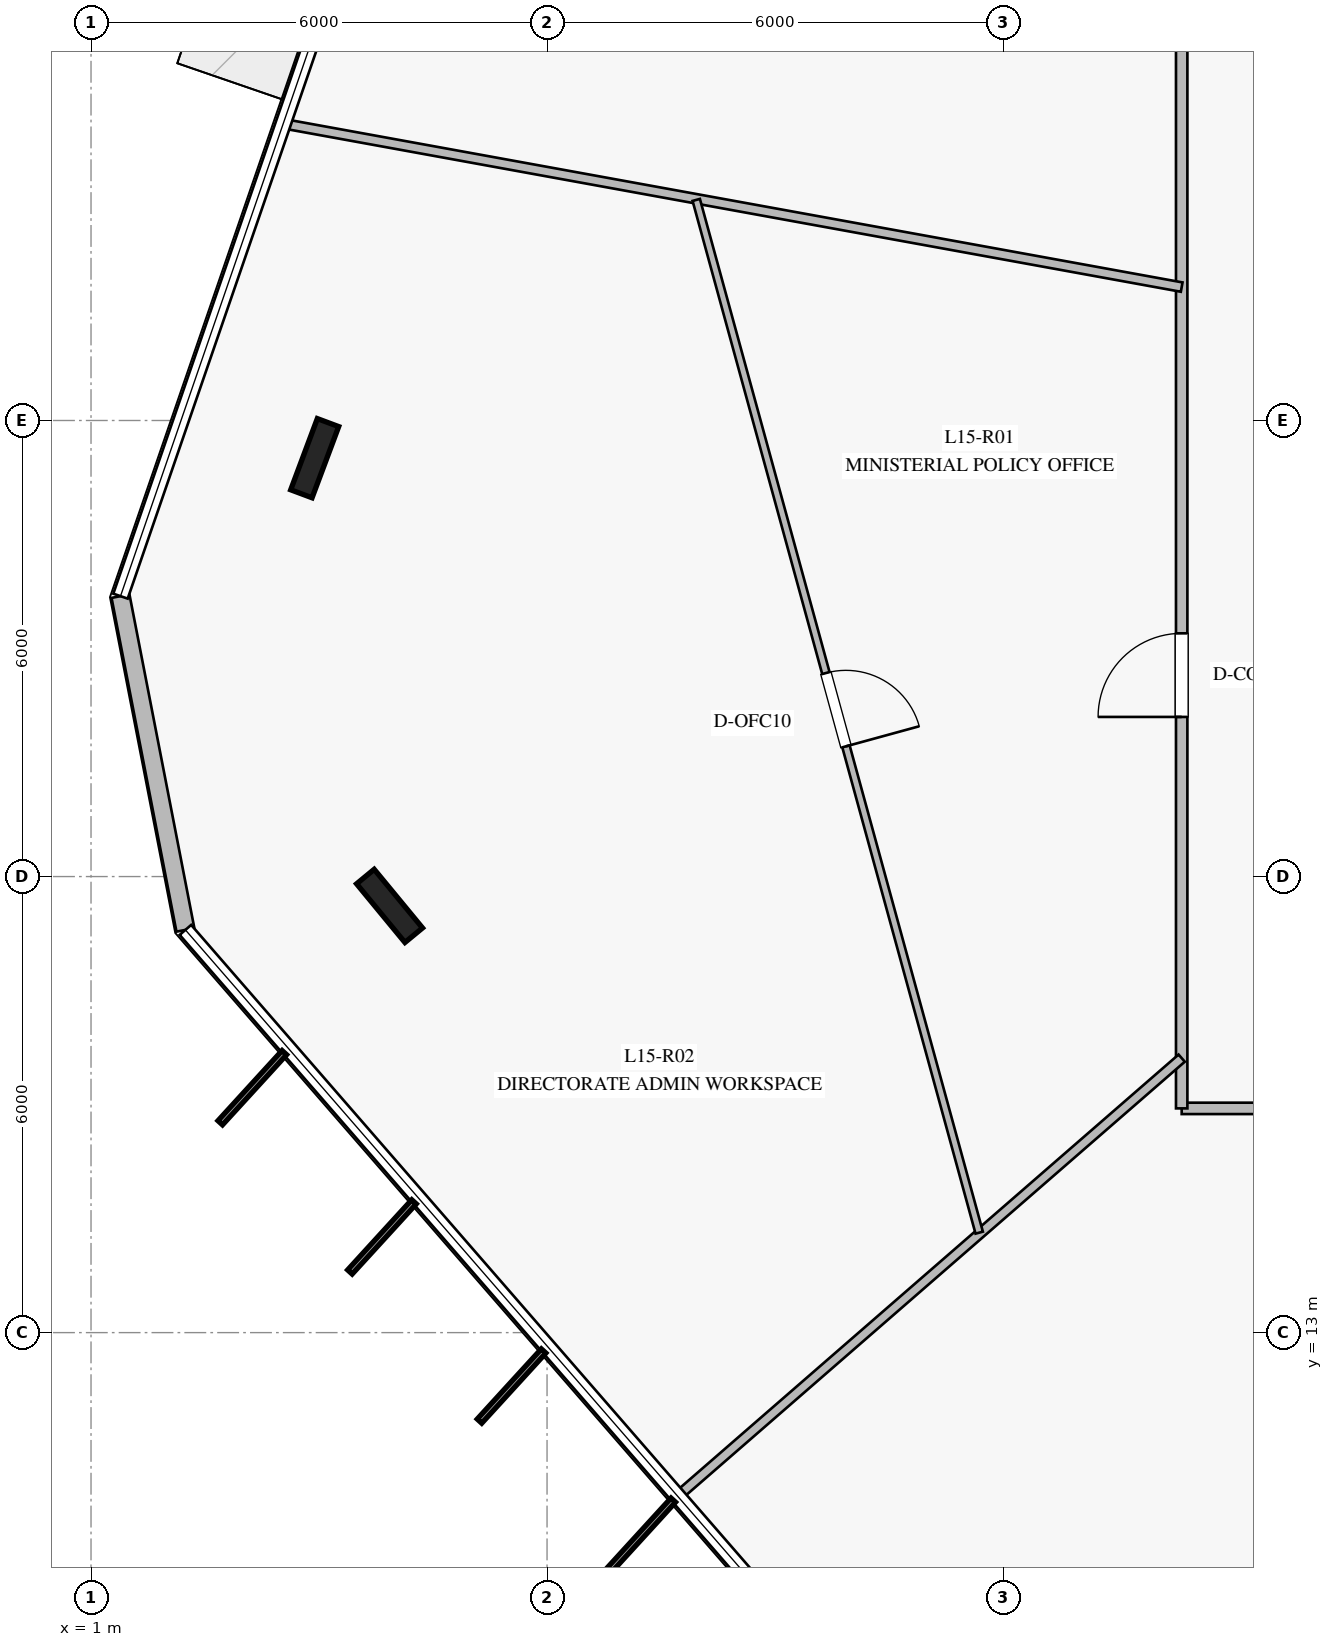
"""IFC4 building model, lengths in metres.
Left out: names, types, materials, properties, quantities, classifications, styles, units other than length and angle.
Written with IfcOpenShell. Run it as: python <this file> out.ifc"""

import sys

from ifc_helpers import new_model, si_unit, direction, frame, frame_2d, origin, origin_2d, place, context, subcontext, project, spatial, rectangle, i_section, extrude, element, fill, save


model = new_model("IFC4")
c1 = context("Model", 3, precision=1e-05, world=origin(), true_north=direction((0.0, 1.0)))
c2 = subcontext(c1, "Body", "Model", "MODEL_VIEW")
j1 = project(units=[si_unit("LENGTHUNIT", "METRE"), si_unit("PLANEANGLEUNIT", "RADIAN")], contexts=[c1])
p1 = place(None, origin())
s1 = spatial("IfcSite", under=j1, at=p1, CompositionType="ELEMENT")
p2 = place(p1, origin())
s2 = spatial("IfcBuilding", under=s1, at=p2, CompositionType="ELEMENT")
p3 = place(p2, frame((0.0, 0.0, 64.0)))
s3 = spatial("IfcBuildingStorey", under=s2, at=p3, CompositionType="ELEMENT", Elevation=64.0)
for number, where, z_axis, x_axis in (
    (1, (3.943, 24.504, 0.0), (0.0, 0.0, 1.0), (0.35, 0.937, 0.0)),
    (2, (4.928, 18.614, 0.0), (0.0, 0.0, 1.0), (-0.636, 0.772, 0.0)),
):
    element("IfcColumn", number, at=place(p3, frame(where, z_axis=z_axis, x_axis=x_axis)), inside=s3, PredefinedType="COLUMN", context=c2, shape_type="SweptSolid", body=[
        extrude(i_section(OverallWidth=0.3, OverallDepth=1.0, WebThickness=0.019, FlangeThickness=0.036, at=origin_2d()), origin(), (0.0, 0.0, 1.0), 4.0),
    ])
p4 = place(p3, frame((1.388, 22.689, 0.0), z_axis=(0.0, 0.0, 1.0), x_axis=(0.190917867073, -0.981606014668, 0.0)))
e3 = element("IfcWall", 3, at=p4, inside=s3, PredefinedType="STANDARD", context=c2, shape_type="SweptSolid", body=[
    extrude(rectangle(XDim=4.473, YDim=0.24, at=frame_2d((2.237, 0.0))), origin(), (0.0, 0.0, 1.0), 3.76),
])
p5 = place(p3, frame((34.65, 15.95, 0.0), z_axis=(0.0, 0.0, 1.0), x_axis=(-1.0, 0.0, 0.0)))
e4 = element("IfcWall", 4, at=p5, inside=s3, PredefinedType="PARTITIONING", context=c2, shape_type="SweptSolid", body=[
    extrude(rectangle(XDim=19.3, YDim=0.15, at=frame_2d((9.65, 0.0))), origin(), (0.0, 0.0, 1.0), 3.21),
])
p6 = place(p5, frame((12.856, 0.0, 0.0)))
e5 = element("IfcOpeningElement", 5, at=p6, cuts=e4, PredefinedType="OPENING", context=c2, shape_type="SweptSolid", body=[
    extrude(rectangle(XDim=1.1, YDim=2.2, at=frame_2d((0.55, 1.1))), frame((0.0, 0.085, 0.0), z_axis=(0.0, -1.0, 0.0), x_axis=(1.0, 0.0, 0.0)), (0.0, 0.0, 1.0), 0.17),
])
p7 = place(p3, frame((15.35, 15.95, 0.0), z_axis=(0.0, 0.0, 1.0), x_axis=(0.0, 1.0, 0.0)))
e6 = element("IfcWall", 6, at=p7, inside=s3, PredefinedType="PARTITIONING", context=c2, shape_type="SweptSolid", body=[
    extrude(rectangle(XDim=18.1, YDim=0.15, at=frame_2d((9.05, 0.0))), origin(), (0.0, 0.0, 1.0), 3.21),
])
p8 = place(p7, frame((5.15, 0.0, 0.0)))
e7 = element("IfcOpeningElement", 7, at=p8, cuts=e6, PredefinedType="OPENING", context=c2, shape_type="SweptSolid", body=[
    extrude(rectangle(XDim=1.1, YDim=2.2, at=frame_2d((0.55, 1.1))), frame((0.0, 0.085, 0.0), z_axis=(0.0, -1.0, 0.0), x_axis=(1.0, 0.0, 0.0)), (0.0, 0.0, 1.0), 0.17),
])
p9 = place(p3, frame((15.35, 26.755, 0.0), z_axis=(0.0, 0.0, 1.0), x_axis=(-0.983855255801, 0.178966018093, 0.0)))
e8 = element("IfcWall", 8, at=p9, inside=s3, PredefinedType="PARTITIONING", context=c2, shape_type="SweptSolid", body=[
    extrude(rectangle(XDim=11.998, YDim=0.125, at=frame_2d((5.999, 0.0))), origin(), (0.0, 0.0, 1.0), 3.05),
])
p10 = place(p3, frame((15.35, 16.611, 0.0), z_axis=(0.0, 0.0, 1.0), x_axis=(-0.754759550248, -0.65600154063, 0.0)))
e9 = element("IfcWall", 9, at=p10, inside=s3, PredefinedType="PARTITIONING", context=c2, shape_type="SweptSolid", body=[
    extrude(rectangle(XDim=8.769, YDim=0.125, at=frame_2d((4.384, 0.0))), origin(), (0.0, 0.0, 1.0), 3.06),
])
p11 = place(p3, frame((8.963, 27.902, 0.0), z_axis=(0.0, 0.0, 1.0), x_axis=(0.264277102177, -0.964446791308, 0.0)))
e10 = element("IfcWall", 10, at=p11, inside=s3, PredefinedType="MOVABLE", context=c2, shape_type="SweptSolid", body=[
    extrude(rectangle(XDim=14.088, YDim=0.1, at=frame_2d((7.044, 0.0))), origin(), (0.0, 0.0, 1.0), 3.05),
])
p12 = place(p11, frame((6.454, 0.0, 0.0)))
e11 = element("IfcOpeningElement", 11, at=p12, cuts=e10, PredefinedType="OPENING", context=c2, shape_type="SweptSolid", body=[
    extrude(rectangle(XDim=1.0, YDim=2.15, at=frame_2d((0.5, 1.075))), frame((0.0, 0.06, 0.0), z_axis=(0.0, -1.0, 0.0), x_axis=(1.0, 0.0, 0.0)), (0.0, 0.0, 1.0), 0.12),
])
p13 = place(p8, origin())
e12 = element("IfcDoor", 12, at=p13, inside=s3, OperationType="SINGLE_SWING_LEFT", PredefinedType="DOOR", context=c2, shape_type="SweptSolid", body=[
    extrude(rectangle(XDim=1.1, YDim=2.2, at=frame_2d((0.55, 1.1))), frame((0.0, 0.025, 0.0), z_axis=(0.0, -1.0, 0.0), x_axis=(1.0, 0.0, 0.0)), (0.0, 0.0, 1.0), 0.05),
])
fill(e7, e12)
p14 = place(p12, origin())
e13 = element("IfcDoor", 13, at=p14, inside=s3, OperationType="SINGLE_SWING_RIGHT", PredefinedType="DOOR", context=c2, shape_type="SweptSolid", body=[
    extrude(rectangle(XDim=1.0, YDim=2.15, at=frame_2d((0.5, 1.075))), frame((0.0, 0.025, 0.0), z_axis=(0.0, -1.0, 0.0), x_axis=(1.0, 0.0, 0.0)), (0.0, 0.0, 1.0), 0.05),
])
fill(e11, e13)
save(model, sys.argv[1])
